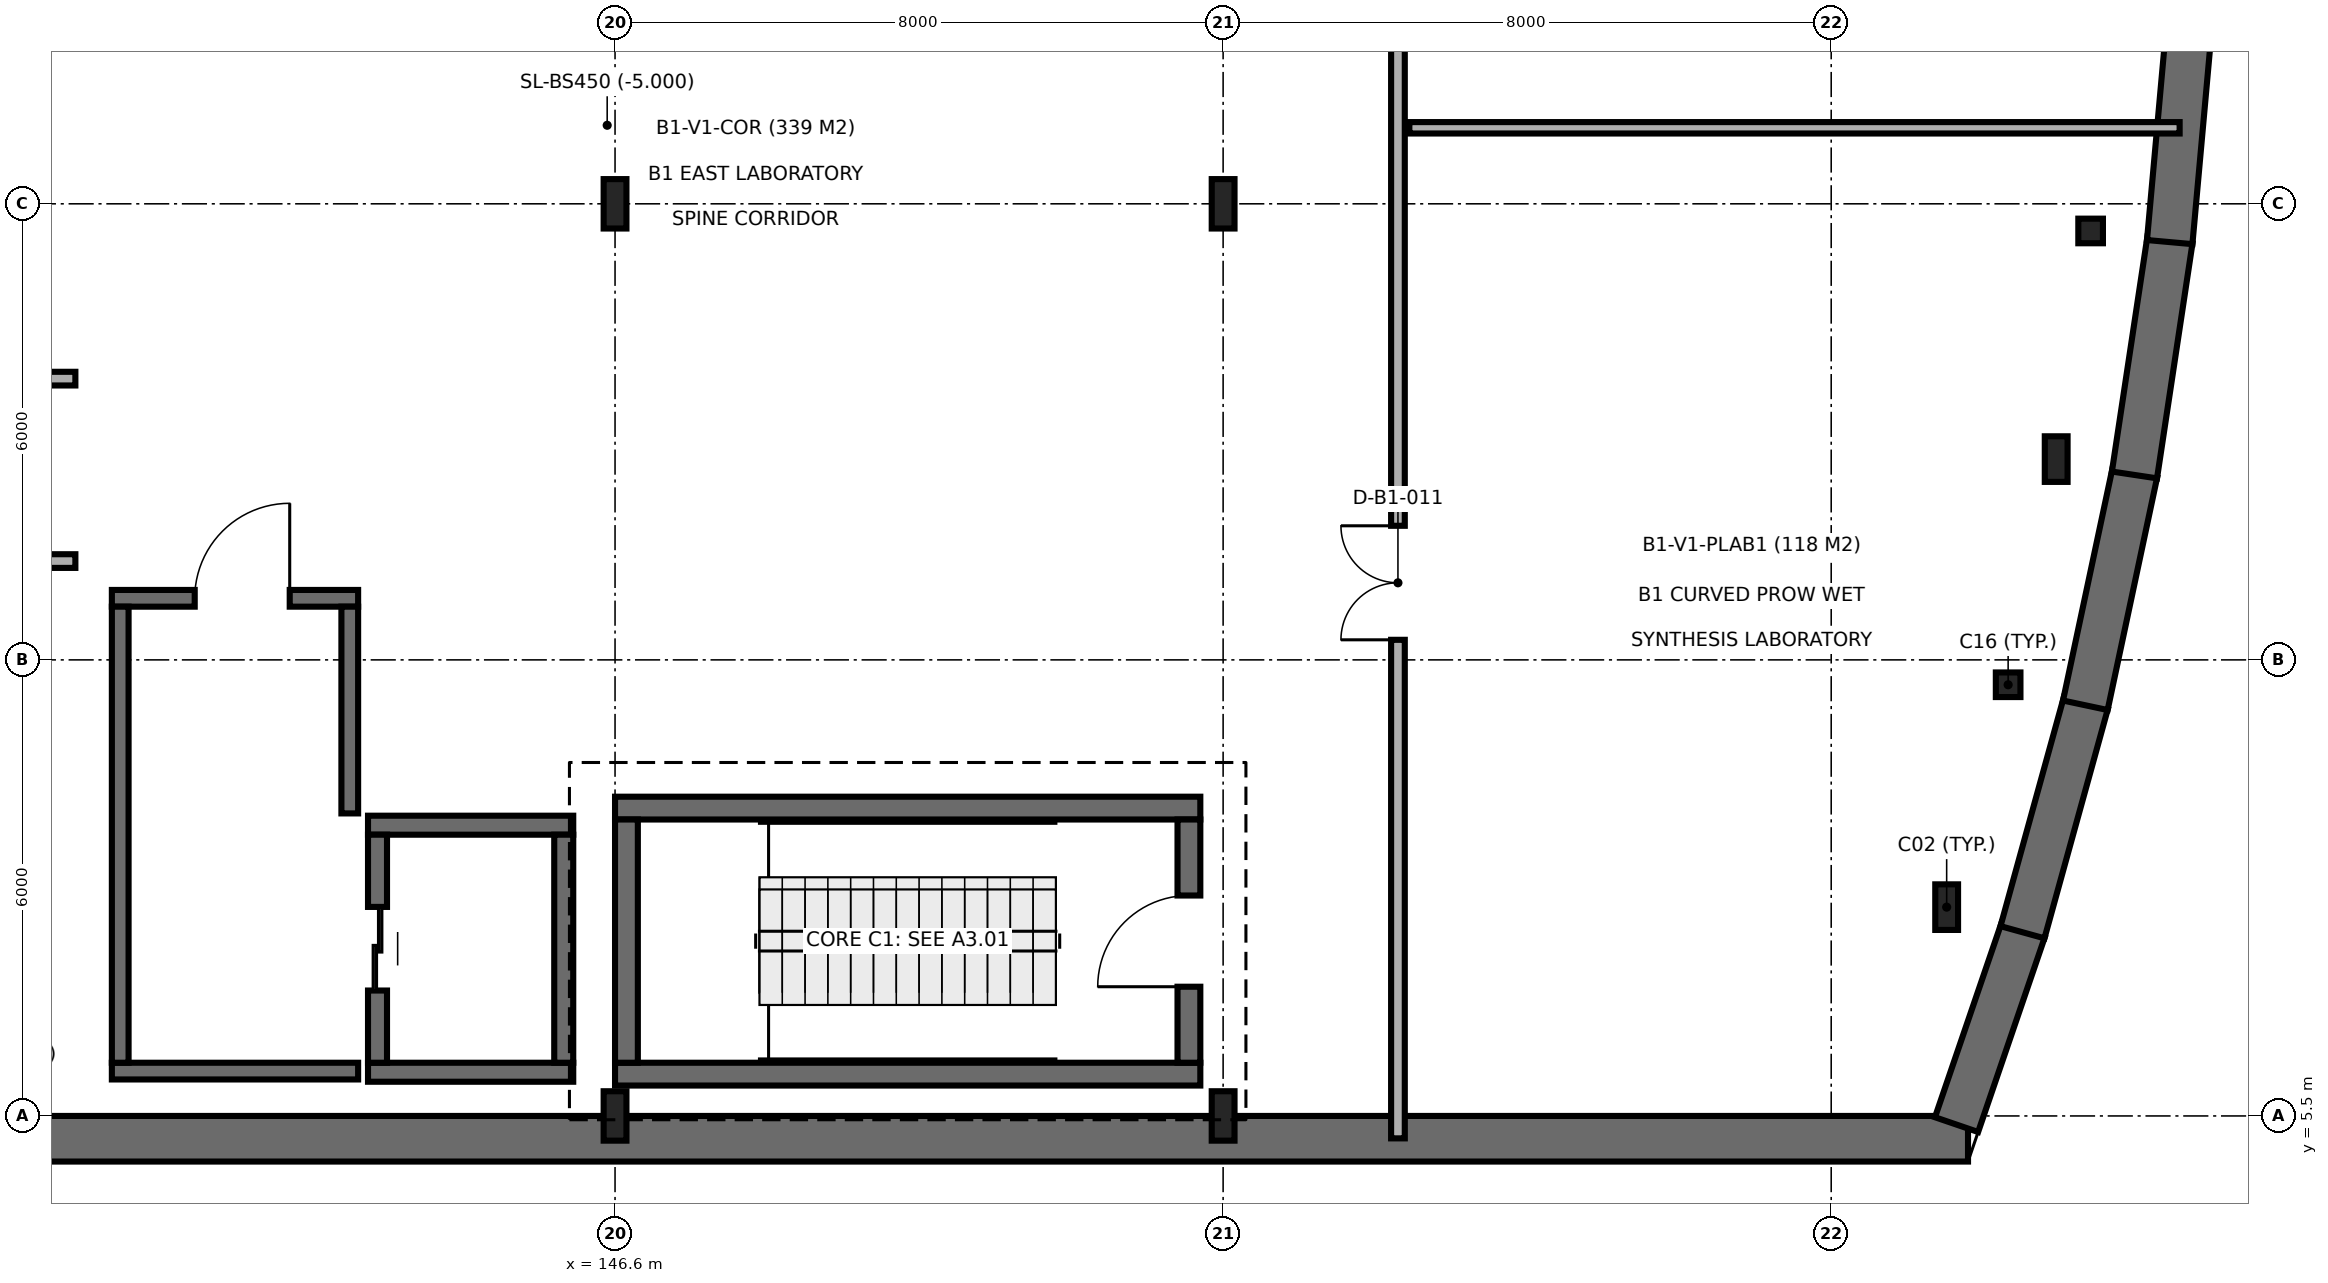
"""IFC4 building model, lengths in metres.
Left out: names, types, materials, properties, quantities, classifications, styles, units other than length and angle.
Written with IfcOpenShell. Run it as: python <this file> out.ifc"""

import sys

from ifc_helpers import new_model, si_unit, direction, frame, frame_2d, origin, origin_2d, place, context, subcontext, project, spatial, rectangle, hollow_circle, i_section, extrude, element, fill, save


model = new_model("IFC4")
c1 = context("Model", 3, precision=1e-05, world=origin(), true_north=direction((0.0, 1.0)))
c2 = subcontext(c1, "Body", "Model", "MODEL_VIEW")
j1 = project(units=[si_unit("LENGTHUNIT", "METRE"), si_unit("PLANEANGLEUNIT", "RADIAN")], contexts=[c1])
p1 = place(None, origin())
s1 = spatial("IfcSite", under=j1, at=p1, CompositionType="ELEMENT")
p2 = place(p1, origin())
s2 = spatial("IfcBuilding", under=s1, at=p2, CompositionType="ELEMENT")
p3 = place(p2, frame((0.0, 0.0, -5.0)))
s3 = spatial("IfcBuildingStorey", under=s2, at=p3, CompositionType="ELEMENT", Elevation=-5.0)
for number, where, z_axis, x_axis in (
    (1, (146.6, 5.5, 0.0), (0.0, 0.0, 1.0), (1.0, 0.0, 0.0)),
    (2, (146.6, 17.5, 0.0), (0.0, 0.0, 1.0), (1.0, 0.0, 0.0)),
    (3, (154.6, 5.5, 0.0), (0.0, 0.0, 1.0), (1.0, 0.0, 0.0)),
    (4, (154.6, 17.5, 0.0), (0.0, 0.0, 1.0), (1.0, 0.0, 0.0)),
):
    element("IfcColumn", number, at=place(p3, frame(where, z_axis=z_axis, x_axis=x_axis)), inside=s3, PredefinedType="COLUMN", context=c2, shape_type="SweptSolid", body=[
        extrude(i_section(OverallWidth=0.3, OverallDepth=0.65, WebThickness=0.016, FlangeThickness=0.031, FilletRadius=0.027, at=origin_2d()), origin(), (0.0, 0.0, 1.0), 5.0),
    ])
p4 = place(p3, frame((164.119, 8.247, 0.0), z_axis=(0.0, 0.0, 1.0), x_axis=(1.0, 0.0, 0.0)))
e5 = element("IfcColumn", 5, at=p4, inside=s3, PredefinedType="COLUMN", context=c2, shape_type="SweptSolid", body=[
    extrude(i_section(OverallWidth=0.3, OverallDepth=0.6, WebThickness=0.015, FlangeThickness=0.03, FilletRadius=0.027, at=origin_2d()), origin(), (0.0, 0.0, 1.0), 5.0),
])
p5 = place(p3, frame((164.928, 11.173, 0.0), z_axis=(0.0, 0.0, 1.0), x_axis=(1.0, 0.0, 0.0)))
e6 = element("IfcColumn", 6, at=p5, inside=s3, PredefinedType="COLUMN", context=c2, shape_type="SweptSolid", body=[
    extrude(hollow_circle(Radius=0.162, WallThickness=0.016, at=origin_2d()), origin(), (0.0, 0.0, 1.0), 5.0),
])
p6 = place(p3, frame((165.56, 14.142, 0.0), z_axis=(0.0, 0.0, 1.0), x_axis=(1.0, 0.0, 0.0)))
e7 = element("IfcColumn", 7, at=p6, inside=s3, PredefinedType="COLUMN", context=c2, shape_type="SweptSolid", body=[
    extrude(i_section(OverallWidth=0.3, OverallDepth=0.6, WebThickness=0.015, FlangeThickness=0.03, FilletRadius=0.027, at=origin_2d()), origin(), (0.0, 0.0, 1.0), 5.0),
])
p7 = place(p3, frame((166.013, 17.143, 0.0), z_axis=(0.0, 0.0, 1.0), x_axis=(1.0, 0.0, 0.0)))
e8 = element("IfcColumn", 8, at=p7, inside=s3, PredefinedType="COLUMN", context=c2, shape_type="SweptSolid", body=[
    extrude(hollow_circle(Radius=0.162, WallThickness=0.016, at=origin_2d()), origin(), (0.0, 0.0, 1.0), 5.0),
])
for number, where, z_axis, x_axis in (
    (9, (146.6, 6.05, 0.0), (0.0, 0.0, 1.0), (1.0, 0.0, 0.0)),
    (10, (154.3, 9.55, 0.0), (0.0, 0.0, 1.0), (-1.0, 0.0, 0.0)),
):
    element("IfcWall", number, at=place(p3, frame(where, z_axis=z_axis, x_axis=x_axis)), inside=s3, PredefinedType="SHEAR", context=c2, shape_type="SweptSolid", body=[
        extrude(rectangle(XDim=7.7, YDim=0.3, at=frame_2d((3.85, 0.0))), origin(), (0.0, 0.0, 1.0), 5.0),
    ])
p8 = place(p3, frame((146.75, 9.4, 0.0), z_axis=(0.0, 0.0, 1.0), x_axis=(0.0, -1.0, 0.0)))
e11 = element("IfcWall", 11, at=p8, inside=s3, PredefinedType="SHEAR", context=c2, shape_type="SweptSolid", body=[
    extrude(rectangle(XDim=3.2, YDim=0.3, at=frame_2d((1.6, 0.0))), origin(), (0.0, 0.0, 1.0), 5.0),
])
p9 = place(p3, frame((154.15, 6.2, 0.0), z_axis=(0.0, 0.0, 1.0), x_axis=(0.0, 1.0, 0.0)))
e12 = element("IfcWall", 12, at=p9, inside=s3, PredefinedType="SHEAR", context=c2, shape_type="SweptSolid", body=[
    extrude(rectangle(XDim=3.2, YDim=0.3, at=frame_2d((1.6, 0.0))), origin(), (0.0, 0.0, 1.0), 5.0),
])
p10 = place(p9, frame((1.0, 0.0, 0.0)))
e13 = element("IfcOpeningElement", 13, at=p10, cuts=e12, PredefinedType="OPENING", context=c2, shape_type="SweptSolid", body=[
    extrude(rectangle(XDim=1.2, YDim=2.15, at=frame_2d((0.6, 1.075))), frame((0.0, 0.16, 0.0), z_axis=(0.0, -1.0, 0.0), x_axis=(1.0, 0.0, 0.0)), (0.0, 0.0, 1.0), 0.32),
])
for number, where, z_axis, x_axis in (
    (14, (143.35, 6.075, 0.0), (0.0, 0.0, 1.0), (1.0, 0.0, 0.0)),
    (15, (146.05, 9.325, 0.0), (0.0, 0.0, 1.0), (-1.0, 0.0, 0.0)),
):
    element("IfcWall", number, at=place(p3, frame(where, z_axis=z_axis, x_axis=x_axis)), inside=s3, PredefinedType="SHEAR", context=c2, shape_type="SweptSolid", body=[
        extrude(rectangle(XDim=2.7, YDim=0.25, at=frame_2d((1.35, 0.0))), origin(), (0.0, 0.0, 1.0), 5.0),
    ])
p11 = place(p3, frame((143.475, 9.2, 0.0), z_axis=(0.0, 0.0, 1.0), x_axis=(0.0, -1.0, 0.0)))
e16 = element("IfcWall", 16, at=p11, inside=s3, PredefinedType="SHEAR", context=c2, shape_type="SweptSolid", body=[
    extrude(rectangle(XDim=3.0, YDim=0.25, at=frame_2d((1.5, 0.0))), origin(), (0.0, 0.0, 1.0), 5.0),
])
p12 = place(p11, frame((0.95, 0.0, 0.0)))
e17 = element("IfcOpeningElement", 17, at=p12, cuts=e16, PredefinedType="OPENING", context=c2, shape_type="SweptSolid", body=[
    extrude(rectangle(XDim=1.1, YDim=2.15, at=frame_2d((0.55, 1.075))), frame((0.0, 0.135, 0.0), z_axis=(0.0, -1.0, 0.0), x_axis=(1.0, 0.0, 0.0)), (0.0, 0.0, 1.0), 0.27),
])
p13 = place(p3, frame((145.925, 6.2, 0.0), z_axis=(0.0, 0.0, 1.0), x_axis=(0.0, 1.0, 0.0)))
e18 = element("IfcWall", 18, at=p13, inside=s3, PredefinedType="SHEAR", context=c2, shape_type="SweptSolid", body=[
    extrude(rectangle(XDim=3.0, YDim=0.25, at=frame_2d((1.5, 0.0))), origin(), (0.0, 0.0, 1.0), 5.0),
])
p14 = place(p3, frame((139.98, 6.09, 0.0), z_axis=(0.0, 0.0, 1.0), x_axis=(1.0, 0.0, 0.0)))
e19 = element("IfcWall", 19, at=p14, inside=s3, PredefinedType="SOLIDWALL", context=c2, shape_type="SweptSolid", body=[
    extrude(rectangle(XDim=3.24, YDim=0.22, at=frame_2d((1.62, 0.0))), origin(), (0.0, 0.0, 1.0), 4.7),
])
p15 = place(p3, frame((143.22, 12.31, 0.0), z_axis=(0.0, 0.0, 1.0), x_axis=(-1.0, 0.0, 0.0)))
e20 = element("IfcWall", 20, at=p15, inside=s3, PredefinedType="SOLIDWALL", context=c2, shape_type="SweptSolid", body=[
    extrude(rectangle(XDim=3.24, YDim=0.22, at=frame_2d((1.62, 0.0))), origin(), (0.0, 0.0, 1.0), 4.7),
])
p16 = place(p15, frame((0.9, 0.0, 0.0)))
e21 = element("IfcOpeningElement", 21, at=p16, cuts=e20, PredefinedType="OPENING", context=c2, shape_type="SweptSolid", body=[
    extrude(rectangle(XDim=1.25, YDim=2.15, at=frame_2d((0.625, 1.075))), frame((0.0, 0.12, 0.0), z_axis=(0.0, -1.0, 0.0), x_axis=(1.0, 0.0, 0.0)), (0.0, 0.0, 1.0), 0.24),
])
p17 = place(p3, frame((140.09, 12.2, 0.0), z_axis=(0.0, 0.0, 1.0), x_axis=(0.0, -1.0, 0.0)))
e22 = element("IfcWall", 22, at=p17, inside=s3, PredefinedType="SOLIDWALL", context=c2, shape_type="SweptSolid", body=[
    extrude(rectangle(XDim=6.0, YDim=0.22, at=frame_2d((3.0, 0.0))), origin(), (0.0, 0.0, 1.0), 4.7),
])
p18 = place(p3, frame((143.11, 9.48, 0.0), z_axis=(0.0, 0.0, 1.0), x_axis=(0.0, 1.0, 0.0)))
e23 = element("IfcWall", 23, at=p18, inside=s3, PredefinedType="SOLIDWALL", context=c2, shape_type="SweptSolid", body=[
    extrude(rectangle(XDim=2.72, YDim=0.22, at=frame_2d((1.36, 0.0))), origin(), (0.0, 0.0, 1.0), 4.7),
])
p19 = place(p3, frame((105.282, 5.2, 0.0), z_axis=(0.0, 0.0, 1.0), x_axis=(1.0, 0.0, 0.0)))
e24 = element("IfcWall", 24, at=p19, inside=s3, PredefinedType="SHEAR", context=c2, shape_type="SweptSolid", body=[
    extrude(rectangle(XDim=59.118, YDim=0.6, at=frame_2d((29.559, 0.0))), origin(), (0.0, 0.0, 1.0), 4.7),
])
p20 = place(p3, frame((164.249, 5.386, 0.0), z_axis=(0.0, 0.0, 1.0), x_axis=(0.323717444321, 0.946153801579, 0.0)))
e25 = element("IfcWall", 25, at=p20, inside=s3, PredefinedType="SHEAR", context=c2, shape_type="SweptSolid", body=[
    extrude(rectangle(XDim=2.705, YDim=0.6, at=frame_2d((1.353, 0.0))), origin(), (0.0, 0.0, 1.0), 4.7),
])
p21 = place(p3, frame((165.116, 7.917, 0.0), z_axis=(0.0, 0.0, 1.0), x_axis=(0.26646418476, 0.963844820622, 0.0)))
e26 = element("IfcWall", 26, at=p21, inside=s3, PredefinedType="SHEAR", context=c2, shape_type="SweptSolid", body=[
    extrude(rectangle(XDim=3.128, YDim=0.6, at=frame_2d((1.564, 0.0))), origin(), (0.0, 0.0, 1.0), 4.7),
])
p22 = place(p3, frame((165.943, 10.903, 0.0), z_axis=(0.0, 0.0, 1.0), x_axis=(0.208212486116, 0.978083616377, 0.0)))
e27 = element("IfcWall", 27, at=p22, inside=s3, PredefinedType="SHEAR", context=c2, shape_type="SweptSolid", body=[
    extrude(rectangle(XDim=3.128, YDim=0.6, at=frame_2d((1.564, 0.0))), origin(), (0.0, 0.0, 1.0), 4.7),
])
p23 = place(p3, frame((166.59, 13.933, 0.0), z_axis=(0.0, 0.0, 1.0), x_axis=(0.149305964746, 0.988791044099, 0.0)))
e28 = element("IfcWall", 28, at=p23, inside=s3, PredefinedType="SHEAR", context=c2, shape_type="SweptSolid", body=[
    extrude(rectangle(XDim=3.128, YDim=0.6, at=frame_2d((1.564, 0.0))), origin(), (0.0, 0.0, 1.0), 4.7),
])
p24 = place(p3, frame((167.053, 16.996, 0.0), z_axis=(0.0, 0.0, 1.0), x_axis=(0.089747627339, 0.995964539222, 0.0)))
e29 = element("IfcWall", 29, at=p24, inside=s3, PredefinedType="SHEAR", context=c2, shape_type="SweptSolid", body=[
    extrude(rectangle(XDim=3.128, YDim=0.6, at=frame_2d((1.564, 0.0))), origin(), (0.0, 0.0, 1.0), 4.7),
])
p25 = place(p3, frame((105.005, 12.8, 0.0), z_axis=(0.0, 0.0, 1.0), x_axis=(1.0, 0.0, 0.0)))
e30 = element("IfcWall", 30, at=p25, inside=s3, PredefinedType="PARTITIONING", context=c2, shape_type="SweptSolid", body=[
    extrude(rectangle(XDim=34.495, YDim=0.18, at=frame_2d((17.248, 0.0))), origin(), (0.0, 0.0, 1.0), 4.7),
])
p26 = place(p25, frame((6.011, 0.0, 0.0)))
e31 = element("IfcOpeningElement", 31, at=p26, cuts=e30, PredefinedType="OPENING", context=c2, shape_type="SweptSolid", body=[
    extrude(rectangle(XDim=1.1, YDim=2.15, at=frame_2d((0.55, 1.075))), frame((0.0, 0.1, 0.0), z_axis=(0.0, -1.0, 0.0), x_axis=(1.0, 0.0, 0.0)), (0.0, 0.0, 1.0), 0.2),
])
p27 = place(p25, frame((11.548, 0.0, 0.0)))
e32 = element("IfcOpeningElement", 32, at=p27, cuts=e30, PredefinedType="OPENING", context=c2, shape_type="SweptSolid", body=[
    extrude(rectangle(XDim=1.5, YDim=2.2, at=frame_2d((0.75, 1.1))), frame((0.0, 0.1, 0.0), z_axis=(0.0, -1.0, 0.0), x_axis=(1.0, 0.0, 0.0)), (0.0, 0.0, 1.0), 0.2),
])
p28 = place(p25, frame((27.548, 0.0, 0.0)))
e33 = element("IfcOpeningElement", 33, at=p28, cuts=e30, PredefinedType="OPENING", context=c2, shape_type="SweptSolid", body=[
    extrude(rectangle(XDim=0.9, YDim=2.1, at=frame_2d((0.45, 1.05))), frame((0.0, 0.1, 0.0), z_axis=(0.0, -1.0, 0.0), x_axis=(1.0, 0.0, 0.0)), (0.0, 0.0, 1.0), 0.2),
])
p29 = place(p3, frame((105.005, 15.2, 0.0), z_axis=(0.0, 0.0, 1.0), x_axis=(1.0, 0.0, 0.0)))
e34 = element("IfcWall", 34, at=p29, inside=s3, PredefinedType="PARTITIONING", context=c2, shape_type="SweptSolid", body=[
    extrude(rectangle(XDim=34.495, YDim=0.18, at=frame_2d((17.248, 0.0))), origin(), (0.0, 0.0, 1.0), 4.7),
])
p30 = place(p29, frame((7.391, 0.0, 0.0)))
e35 = element("IfcOpeningElement", 35, at=p30, cuts=e34, PredefinedType="OPENING", context=c2, shape_type="SweptSolid", body=[
    extrude(rectangle(XDim=0.9, YDim=2.1, at=frame_2d((0.45, 1.05))), frame((0.0, 0.1, 0.0), z_axis=(0.0, -1.0, 0.0), x_axis=(1.0, 0.0, 0.0)), (0.0, 0.0, 1.0), 0.2),
])
p31 = place(p29, frame((18.45, 0.0, 0.0)))
e36 = element("IfcOpeningElement", 36, at=p31, cuts=e34, PredefinedType="OPENING", context=c2, shape_type="SweptSolid", body=[
    extrude(rectangle(XDim=0.95, YDim=2.1, at=frame_2d((0.475, 1.05))), frame((0.0, 0.1, 0.0), z_axis=(0.0, -1.0, 0.0), x_axis=(1.0, 0.0, 0.0)), (0.0, 0.0, 1.0), 0.2),
])
p32 = place(p29, frame((27.466, 0.0, 0.0)))
e37 = element("IfcOpeningElement", 37, at=p32, cuts=e34, PredefinedType="OPENING", context=c2, shape_type="SweptSolid", body=[
    extrude(rectangle(XDim=1.0, YDim=2.15, at=frame_2d((0.5, 1.075))), frame((0.0, 0.1, 0.0), z_axis=(0.0, -1.0, 0.0), x_axis=(1.0, 0.0, 0.0)), (0.0, 0.0, 1.0), 0.2),
])
p33 = place(p3, frame((156.9, 5.205, 0.0), z_axis=(0.0, 0.0, 1.0), x_axis=(0.0, 1.0, 0.0)))
e38 = element("IfcWall", 38, at=p33, inside=s3, PredefinedType="PARTITIONING", context=c2, shape_type="SweptSolid", body=[
    extrude(rectangle(XDim=34.295, YDim=0.18, at=frame_2d((17.147, 0.0))), origin(), (0.0, 0.0, 1.0), 4.7),
])
p34 = place(p33, frame((6.559, 0.0, 0.0)))
e39 = element("IfcOpeningElement", 39, at=p34, cuts=e38, PredefinedType="OPENING", context=c2, shape_type="SweptSolid", body=[
    extrude(rectangle(XDim=1.5, YDim=2.2, at=frame_2d((0.75, 1.1))), frame((0.0, 0.1, 0.0), z_axis=(0.0, -1.0, 0.0), x_axis=(1.0, 0.0, 0.0)), (0.0, 0.0, 1.0), 0.2),
])
p35 = place(p33, frame((17.261, 0.0, 0.0)))
e40 = element("IfcOpeningElement", 40, at=p35, cuts=e38, PredefinedType="OPENING", context=c2, shape_type="SweptSolid", body=[
    extrude(rectangle(XDim=1.1, YDim=2.15, at=frame_2d((0.55, 1.075))), frame((0.0, 0.1, 0.0), z_axis=(0.0, -1.0, 0.0), x_axis=(1.0, 0.0, 0.0)), (0.0, 0.0, 1.0), 0.2),
])
p36 = place(p33, frame((27.343, 0.0, 0.0)))
e41 = element("IfcOpeningElement", 41, at=p36, cuts=e38, PredefinedType="OPENING", context=c2, shape_type="SweptSolid", body=[
    extrude(rectangle(XDim=0.95, YDim=2.1, at=frame_2d((0.475, 1.05))), frame((0.0, 0.1, 0.0), z_axis=(0.0, -1.0, 0.0), x_axis=(1.0, 0.0, 0.0)), (0.0, 0.0, 1.0), 0.2),
])
p37 = place(p3, frame((157.05, 18.5, 0.0), z_axis=(0.0, 0.0, 1.0), x_axis=(1.0, 0.0, 0.0)))
e42 = element("IfcWall", 42, at=p37, inside=s3, PredefinedType="PARTITIONING", context=c2, shape_type="SweptSolid", body=[
    extrude(rectangle(XDim=10.134, YDim=0.15, at=frame_2d((5.067, 0.0))), origin(), (0.0, 0.0, 1.0), 4.2),
])
p38 = place(p10, origin())
e43 = element("IfcDoor", 43, at=p38, inside=s3, OperationType="SINGLE_SWING_LEFT", PredefinedType="DOOR", context=c2, shape_type="SweptSolid", body=[
    extrude(rectangle(XDim=1.2, YDim=2.15, at=frame_2d((0.6, 1.075))), frame((0.0, 0.025, 0.0), z_axis=(0.0, -1.0, 0.0), x_axis=(1.0, 0.0, 0.0)), (0.0, 0.0, 1.0), 0.05),
])
fill(e13, e43)
p39 = place(p12, origin())
e44 = element("IfcDoor", 44, at=p39, inside=s3, OperationType="DOUBLE_DOOR_SLIDING", PredefinedType="DOOR", context=c2, shape_type="SweptSolid", body=[
    extrude(rectangle(XDim=1.1, YDim=2.15, at=frame_2d((0.55, 1.075))), frame((0.0, 0.025, 0.0), z_axis=(0.0, -1.0, 0.0), x_axis=(1.0, 0.0, 0.0)), (0.0, 0.0, 1.0), 0.05),
])
fill(e17, e44)
p40 = place(p16, frame((1.25, 0.0, 0.0), z_axis=(0.0, 0.0, 1.0), x_axis=(-1.0, 0.0, 0.0)))
e45 = element("IfcDoor", 45, at=p40, inside=s3, OperationType="SINGLE_SWING_LEFT", PredefinedType="DOOR", context=c2, shape_type="SweptSolid", body=[
    extrude(rectangle(XDim=1.25, YDim=2.15, at=frame_2d((0.625, 1.075))), frame((0.0, 0.025, 0.0), z_axis=(0.0, -1.0, 0.0), x_axis=(1.0, 0.0, 0.0)), (0.0, 0.0, 1.0), 0.05),
])
fill(e21, e45)
p41 = place(p34, origin())
e46 = element("IfcDoor", 46, at=p41, inside=s3, OperationType="DOUBLE_DOOR_SINGLE_SWING", PredefinedType="DOOR", context=c2, shape_type="SweptSolid", body=[
    extrude(rectangle(XDim=1.5, YDim=2.2, at=frame_2d((0.75, 1.1))), frame((0.0, 0.025, 0.0), z_axis=(0.0, -1.0, 0.0), x_axis=(1.0, 0.0, 0.0)), (0.0, 0.0, 1.0), 0.05),
])
fill(e39, e46)
save(model, sys.argv[1])
